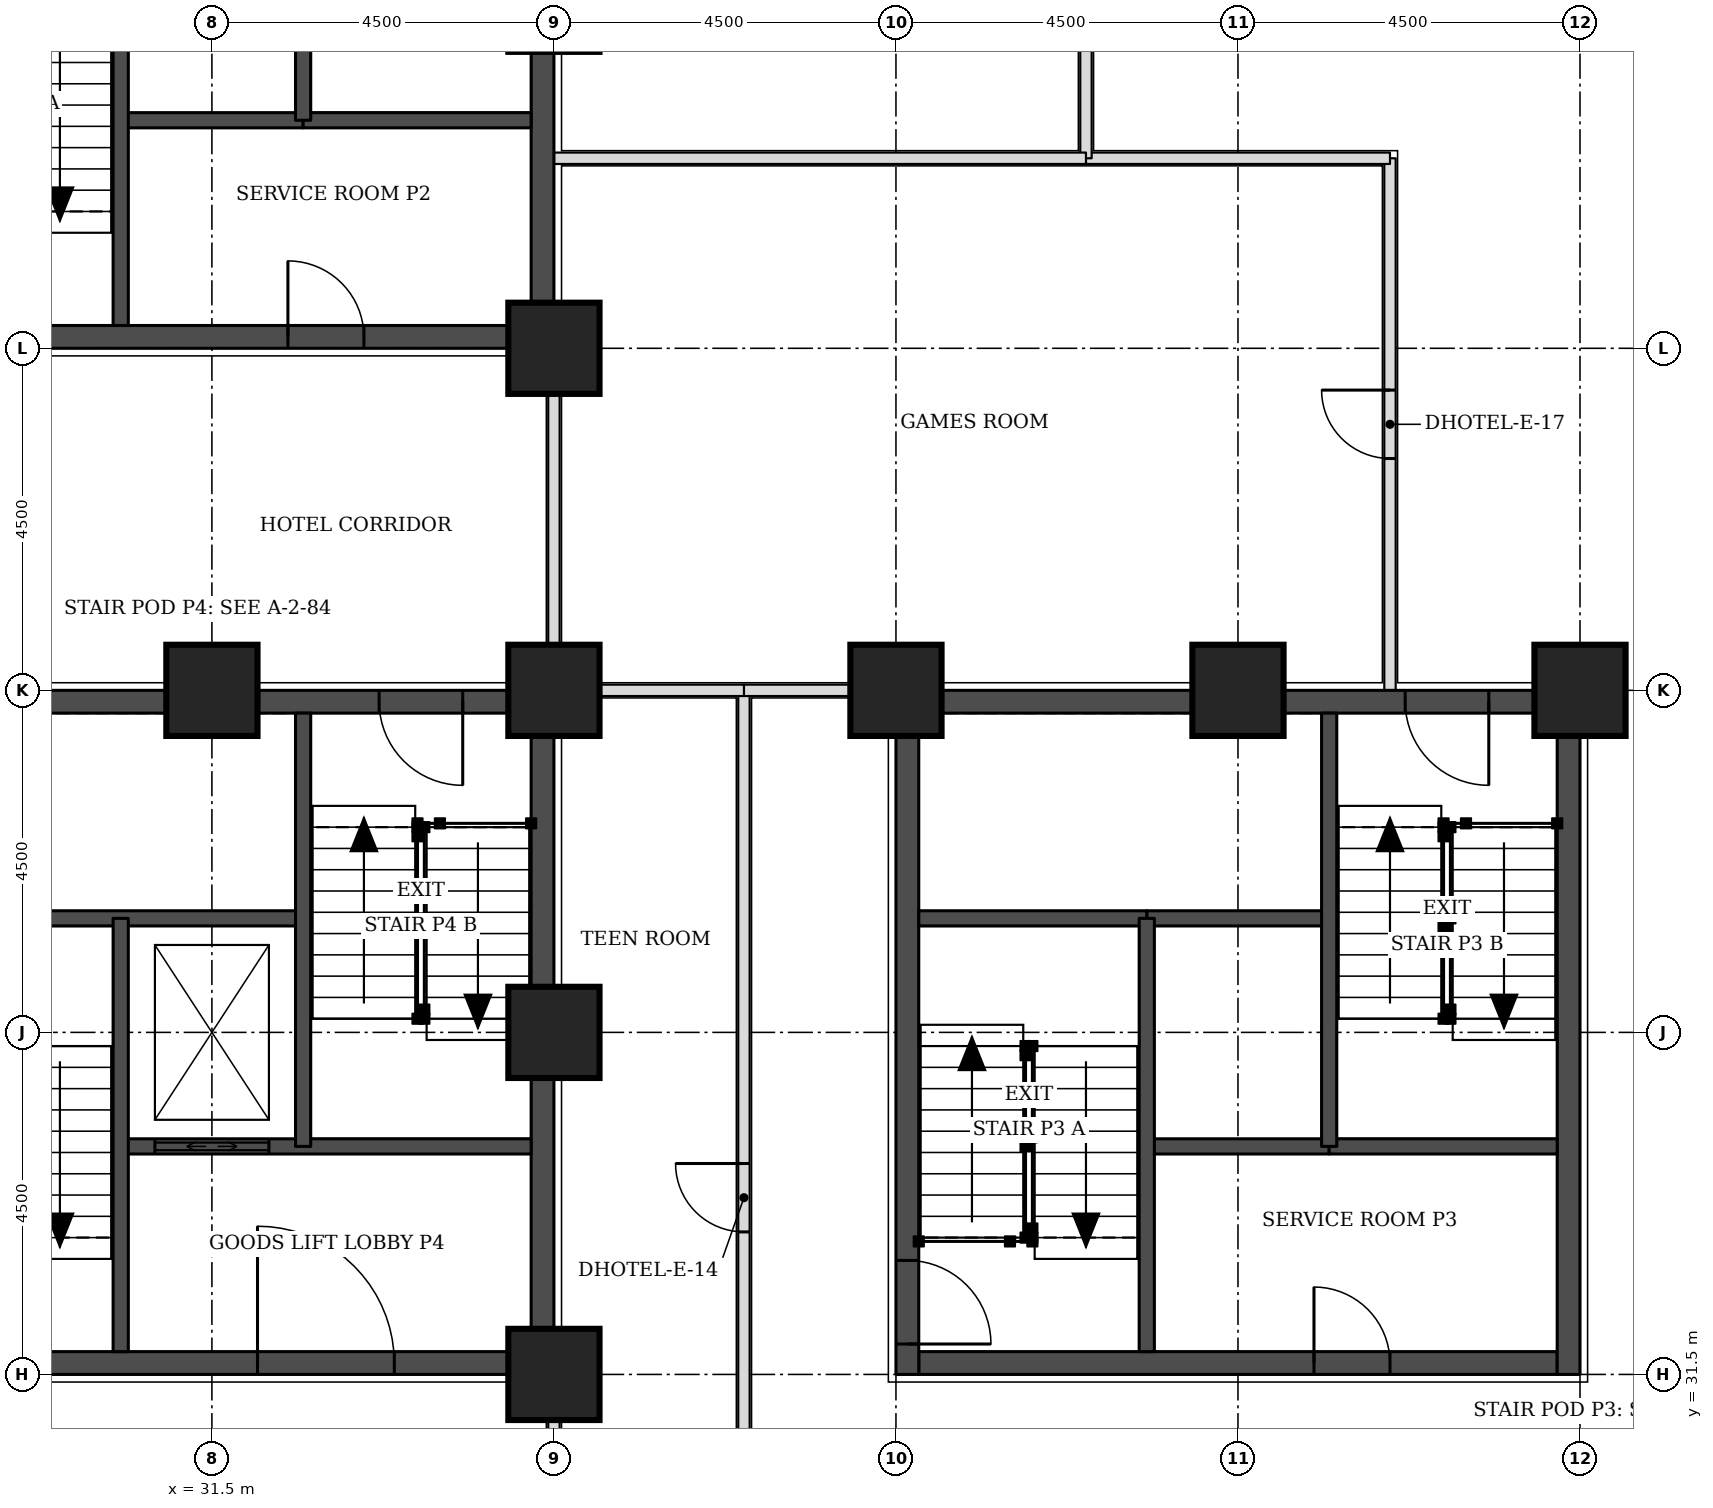
"""IFC4 building model, lengths in metres.
Left out: names, types, materials, properties, quantities, classifications, styles, units other than length and angle.
Written with IfcOpenShell. Run it as: python <this file> out.ifc"""

import sys

from ifc_helpers import new_model, si_unit, direction, frame, frame_2d, origin, origin_2d, place, context, subcontext, project, spatial, rectangle, extrude, element, fill, save


model = new_model("IFC4")
c1 = context("Model", 3, precision=1e-05, world=origin(), true_north=direction((0.0, 1.0)))
c2 = subcontext(c1, "Body", "Model", "MODEL_VIEW")
j1 = project(units=[si_unit("LENGTHUNIT", "METRE"), si_unit("PLANEANGLEUNIT", "RADIAN")], contexts=[c1])
p1 = place(None, origin())
s1 = spatial("IfcSite", under=j1, at=p1, CompositionType="ELEMENT")
p2 = place(p1, origin())
s2 = spatial("IfcBuilding", under=s1, at=p2, CompositionType="ELEMENT")
p3 = place(p2, frame((0.0, 0.0, 62.7)))
s3 = spatial("IfcBuildingStorey", under=s2, at=p3, CompositionType="ELEMENT", Elevation=62.7)
for number, where, z_axis, x_axis in (
    (1, (36.0, 31.5, 0.0), (0.0, 0.0, 1.0), (1.0, 0.0, 0.0)),
    (2, (36.0, 36.0, 0.0), (0.0, 0.0, 1.0), (1.0, 0.0, 0.0)),
    (3, (31.5, 40.5, 0.0), (0.0, 0.0, 1.0), (1.0, 0.0, 0.0)),
    (4, (36.0, 40.5, 0.0), (0.0, 0.0, 1.0), (1.0, 0.0, 0.0)),
    (5, (40.5, 40.5, 0.0), (0.0, 0.0, 1.0), (1.0, 0.0, 0.0)),
    (6, (45.0, 40.5, 0.0), (0.0, 0.0, 1.0), (1.0, 0.0, 0.0)),
    (7, (49.5, 40.5, 0.0), (0.0, 0.0, 1.0), (1.0, 0.0, 0.0)),
    (8, (36.0, 45.0, 0.0), (0.0, 0.0, 1.0), (1.0, 0.0, 0.0)),
):
    element("IfcColumn", number, at=place(p3, frame(where, z_axis=z_axis, x_axis=x_axis)), inside=s3, PredefinedType="COLUMN", context=c2, shape_type="SweptSolid", body=[
        extrude(rectangle(XDim=1.2, YDim=1.2, at=origin_2d()), origin(), (0.0, 0.0, 1.0), 3.3),
    ])
p4 = place(p3, frame((27.3, 45.15, 0.0), z_axis=(0.0, 0.0, 1.0), x_axis=(1.0, 0.0, 0.0)))
e9 = element("IfcWall", 9, at=p4, inside=s3, PredefinedType="SHEAR", context=c2, shape_type="SweptSolid", body=[
    extrude(rectangle(XDim=8.4, YDim=0.3, at=frame_2d((4.2, 0.0))), origin(), (0.0, 0.0, 1.0), 3.3),
])
p5 = place(p4, frame((5.2, 0.0, 0.0)))
e10 = element("IfcOpeningElement", 10, at=p5, cuts=e9, PredefinedType="OPENING", context=c2, shape_type="SweptSolid", body=[
    extrude(rectangle(XDim=1.0, YDim=2.1, at=frame_2d((0.5, 1.05))), frame((0.0, 0.16, 0.0), z_axis=(0.0, -1.0, 0.0), x_axis=(1.0, 0.0, 0.0)), (0.0, 0.0, 1.0), 0.32),
])
p6 = place(p3, frame((35.85, 45.0, 0.0), z_axis=(0.0, 0.0, 1.0), x_axis=(0.0, 1.0, 0.0)))
e11 = element("IfcWall", 11, at=p6, inside=s3, PredefinedType="SHEAR", context=c2, shape_type="SweptSolid", body=[
    extrude(rectangle(XDim=9.0, YDim=0.3, at=frame_2d((4.5, 0.0))), origin(), (0.0, 0.0, 1.0), 3.3),
])
p7 = place(p3, frame((40.8, 31.65, 0.0), z_axis=(0.0, 0.0, 1.0), x_axis=(1.0, 0.0, 0.0)))
e12 = element("IfcWall", 12, at=p7, inside=s3, PredefinedType="SHEAR", context=c2, shape_type="SweptSolid", body=[
    extrude(rectangle(XDim=8.4, YDim=0.3, at=frame_2d((4.2, 0.0))), origin(), (0.0, 0.0, 1.0), 3.3),
])
p8 = place(p7, frame((5.2, 0.0, 0.0)))
e13 = element("IfcOpeningElement", 13, at=p8, cuts=e12, PredefinedType="OPENING", context=c2, shape_type="SweptSolid", body=[
    extrude(rectangle(XDim=1.0, YDim=2.1, at=frame_2d((0.5, 1.05))), frame((0.0, 0.16, 0.0), z_axis=(0.0, -1.0, 0.0), x_axis=(1.0, 0.0, 0.0)), (0.0, 0.0, 1.0), 0.32),
])
p9 = place(p3, frame((40.8, 40.35, 0.0), z_axis=(0.0, 0.0, 1.0), x_axis=(1.0, 0.0, 0.0)))
e14 = element("IfcWall", 14, at=p9, inside=s3, PredefinedType="SHEAR", context=c2, shape_type="SweptSolid", body=[
    extrude(rectangle(XDim=8.4, YDim=0.3, at=frame_2d((4.2, 0.0))), origin(), (0.0, 0.0, 1.0), 3.3),
])
p10 = place(p9, frame((6.4, 0.0, 0.0)))
e15 = element("IfcOpeningElement", 15, at=p10, cuts=e14, PredefinedType="OPENING", context=c2, shape_type="SweptSolid", body=[
    extrude(rectangle(XDim=1.1, YDim=2.1, at=frame_2d((0.55, 1.05))), frame((0.0, 0.16, 0.0), z_axis=(0.0, -1.0, 0.0), x_axis=(1.0, 0.0, 0.0)), (0.0, 0.0, 1.0), 0.32),
])
p11 = place(p3, frame((40.65, 31.5, 0.0), z_axis=(0.0, 0.0, 1.0), x_axis=(0.0, 1.0, 0.0)))
e16 = element("IfcWall", 16, at=p11, inside=s3, PredefinedType="SHEAR", context=c2, shape_type="SweptSolid", body=[
    extrude(rectangle(XDim=9.0, YDim=0.3, at=frame_2d((4.5, 0.0))), origin(), (0.0, 0.0, 1.0), 3.3),
])
p12 = place(p11, frame((0.4, 0.0, 0.0)))
e17 = element("IfcOpeningElement", 17, at=p12, cuts=e16, PredefinedType="OPENING", context=c2, shape_type="SweptSolid", body=[
    extrude(rectangle(XDim=1.1, YDim=2.1, at=frame_2d((0.55, 1.05))), frame((0.0, 0.16, 0.0), z_axis=(0.0, -1.0, 0.0), x_axis=(1.0, 0.0, 0.0)), (0.0, 0.0, 1.0), 0.32),
])
p13 = place(p3, frame((49.35, 31.5, 0.0), z_axis=(0.0, 0.0, 1.0), x_axis=(0.0, 1.0, 0.0)))
e18 = element("IfcWall", 18, at=p13, inside=s3, PredefinedType="SHEAR", context=c2, shape_type="SweptSolid", body=[
    extrude(rectangle(XDim=9.0, YDim=0.3, at=frame_2d((4.5, 0.0))), origin(), (0.0, 0.0, 1.0), 3.3),
])
p14 = place(p3, frame((27.3, 31.65, 0.0), z_axis=(0.0, 0.0, 1.0), x_axis=(1.0, 0.0, 0.0)))
e19 = element("IfcWall", 19, at=p14, inside=s3, PredefinedType="SHEAR", context=c2, shape_type="SweptSolid", body=[
    extrude(rectangle(XDim=8.4, YDim=0.3, at=frame_2d((4.2, 0.0))), origin(), (0.0, 0.0, 1.0), 3.3),
])
p15 = place(p14, frame((4.8, 0.0, 0.0)))
e20 = element("IfcOpeningElement", 20, at=p15, cuts=e19, PredefinedType="OPENING", context=c2, shape_type="SweptSolid", body=[
    extrude(rectangle(XDim=1.8, YDim=2.1, at=frame_2d((0.9, 1.05))), frame((0.0, 0.16, 0.0), z_axis=(0.0, -1.0, 0.0), x_axis=(1.0, 0.0, 0.0)), (0.0, 0.0, 1.0), 0.32),
])
p16 = place(p3, frame((27.3, 40.35, 0.0), z_axis=(0.0, 0.0, 1.0), x_axis=(1.0, 0.0, 0.0)))
e21 = element("IfcWall", 21, at=p16, inside=s3, PredefinedType="SHEAR", context=c2, shape_type="SweptSolid", body=[
    extrude(rectangle(XDim=8.4, YDim=0.3, at=frame_2d((4.2, 0.0))), origin(), (0.0, 0.0, 1.0), 3.3),
])
p17 = place(p16, frame((6.4, 0.0, 0.0)))
e22 = element("IfcOpeningElement", 22, at=p17, cuts=e21, PredefinedType="OPENING", context=c2, shape_type="SweptSolid", body=[
    extrude(rectangle(XDim=1.1, YDim=2.1, at=frame_2d((0.55, 1.05))), frame((0.0, 0.16, 0.0), z_axis=(0.0, -1.0, 0.0), x_axis=(1.0, 0.0, 0.0)), (0.0, 0.0, 1.0), 0.32),
])
p18 = place(p3, frame((35.85, 31.5, 0.0), z_axis=(0.0, 0.0, 1.0), x_axis=(0.0, 1.0, 0.0)))
e23 = element("IfcWall", 23, at=p18, inside=s3, PredefinedType="SHEAR", context=c2, shape_type="SweptSolid", body=[
    extrude(rectangle(XDim=9.0, YDim=0.3, at=frame_2d((4.5, 0.0))), origin(), (0.0, 0.0, 1.0), 3.3),
])
p19 = place(p3, frame((38.5, 27.15, 0.0), z_axis=(0.0, 0.0, 1.0), x_axis=(0.0, 1.0, 0.0)))
e24 = element("IfcWall", 24, at=p19, inside=s3, PredefinedType="PARTITIONING", context=c2, shape_type="SweptSolid", body=[
    extrude(rectangle(XDim=13.35, YDim=0.15, at=frame_2d((6.675, 0.0))), origin(), (0.0, 0.0, 1.0), 3.08),
])
p20 = place(p19, frame((6.225, 0.0, 0.0)))
e25 = element("IfcOpeningElement", 25, at=p20, cuts=e24, PredefinedType="OPENING", context=c2, shape_type="SweptSolid", body=[
    extrude(rectangle(XDim=0.9, YDim=2.1, at=frame_2d((0.45, 1.05))), frame((0.0, 0.085, 0.0), z_axis=(0.0, -1.0, 0.0), x_axis=(1.0, 0.0, 0.0)), (0.0, 0.0, 1.0), 0.17),
])
for number, where, z_axis, x_axis in (
    (26, (36.0, 29.5, 0.0), (0.0, 0.0, 1.0), (0.0, 1.0, 0.0)),
    (27, (38.5, 40.5, 0.0), (0.0, 0.0, 1.0), (1.0, 0.0, 0.0)),
):
    element("IfcWall", number, at=place(p3, frame(where, z_axis=z_axis, x_axis=x_axis)), inside=s3, PredefinedType="PARTITIONING", context=c2, shape_type="SweptSolid", body=[
        extrude(rectangle(XDim=1.95, YDim=0.15, at=frame_2d((0.975, 0.0))), origin(), (0.0, 0.0, 1.0), 2.33),
    ])
p21 = place(p3, frame((36.0, 40.55, 0.0), z_axis=(0.0, 0.0, 1.0), x_axis=(0.0, 1.0, 0.0)))
e28 = element("IfcWall", 28, at=p21, inside=s3, PredefinedType="PARTITIONING", context=c2, shape_type="SweptSolid", body=[
    extrude(rectangle(XDim=4.4, YDim=0.15, at=frame_2d((2.2, 0.0))), origin(), (0.0, 0.0, 1.0), 2.33),
])
p22 = place(p3, frame((47.0, 40.5, 0.0), z_axis=(0.0, 0.0, 1.0), x_axis=(0.0, 1.0, 0.0)))
e29 = element("IfcWall", 29, at=p22, inside=s3, PredefinedType="PARTITIONING", context=c2, shape_type="SweptSolid", body=[
    extrude(rectangle(XDim=7.0, YDim=0.15, at=frame_2d((3.5, 0.0))), origin(), (0.0, 0.0, 1.0), 3.08),
])
p23 = place(p22, frame((3.05, 0.0, 0.0)))
e30 = element("IfcOpeningElement", 30, at=p23, cuts=e29, PredefinedType="OPENING", context=c2, shape_type="SweptSolid", body=[
    extrude(rectangle(XDim=0.9, YDim=2.1, at=frame_2d((0.45, 1.05))), frame((0.0, 0.085, 0.0), z_axis=(0.0, -1.0, 0.0), x_axis=(1.0, 0.0, 0.0)), (0.0, 0.0, 1.0), 0.17),
])
p24 = place(p3, frame((43.0, 47.5, 0.0), z_axis=(0.0, 0.0, 1.0), x_axis=(1.0, 0.0, 0.0)))
e31 = element("IfcWall", 31, at=p24, inside=s3, PredefinedType="PARTITIONING", context=c2, shape_type="SweptSolid", body=[
    extrude(rectangle(XDim=4.0, YDim=0.15, at=frame_2d((2.0, 0.0))), origin(), (0.0, 0.0, 1.0), 3.08),
])
p25 = place(p3, frame((43.0, 47.5, 0.0), z_axis=(0.0, 0.0, 1.0), x_axis=(0.0, 1.0, 0.0)))
e32 = element("IfcWall", 32, at=p25, inside=s3, PredefinedType="PARTITIONING", context=c2, shape_type="SweptSolid", body=[
    extrude(rectangle(XDim=7.85, YDim=0.15, at=frame_2d((3.925, 0.0))), origin(), (0.0, 0.0, 1.0), 3.08),
])
p26 = place(p25, frame((3.475, 0.0, 0.0)))
e33 = element("IfcOpeningElement", 33, at=p26, cuts=e32, PredefinedType="OPENING", context=c2, shape_type="SweptSolid", body=[
    extrude(rectangle(XDim=0.9, YDim=2.1, at=frame_2d((0.45, 1.05))), frame((0.0, 0.085, 0.0), z_axis=(0.0, -1.0, 0.0), x_axis=(1.0, 0.0, 0.0)), (0.0, 0.0, 1.0), 0.17),
])
p27 = place(p3, frame((36.05, 40.5, 0.0), z_axis=(0.0, 0.0, 1.0), x_axis=(1.0, 0.0, 0.0)))
e34 = element("IfcWall", 34, at=p27, inside=s3, PredefinedType="PARTITIONING", context=c2, shape_type="SweptSolid", body=[
    extrude(rectangle(XDim=2.45, YDim=0.15, at=frame_2d((1.225, 0.0))), origin(), (0.0, 0.0, 1.0), 2.33),
])
p28 = place(p3, frame((36.0, 47.5, 0.0), z_axis=(0.0, 0.0, 1.0), x_axis=(1.0, 0.0, 0.0)))
e35 = element("IfcWall", 35, at=p28, inside=s3, PredefinedType="PARTITIONING", context=c2, shape_type="SweptSolid", body=[
    extrude(rectangle(XDim=7.0, YDim=0.15, at=frame_2d((3.5, 0.0))), origin(), (0.0, 0.0, 1.0), 3.08),
])
p29 = place(p3, frame((30.3, 48.0, 0.0), z_axis=(0.0, 0.0, 1.0), x_axis=(1.0, 0.0, 0.0)))
e36 = element("IfcWall", 36, at=p29, inside=s3, PredefinedType="SOLIDWALL", context=c2, shape_type="SweptSolid", body=[
    extrude(rectangle(XDim=2.4, YDim=0.2, at=frame_2d((1.2, 0.0))), origin(), (0.0, 0.0, 1.0), 3.08),
])
p30 = place(p3, frame((32.7, 48.0, 0.0), z_axis=(0.0, 0.0, 1.0), x_axis=(1.0, 0.0, 0.0)))
e37 = element("IfcWall", 37, at=p30, inside=s3, PredefinedType="SOLIDWALL", context=c2, shape_type="SweptSolid", body=[
    extrude(rectangle(XDim=3.0, YDim=0.2, at=frame_2d((1.5, 0.0))), origin(), (0.0, 0.0, 1.0), 3.08),
])
for number, where, z_axis, x_axis in (
    (38, (30.3, 45.3, 0.0), (0.0, 0.0, 1.0), (0.0, 1.0, 0.0)),
    (39, (32.7, 48.0, 0.0), (0.0, 0.0, 1.0), (0.0, 1.0, 0.0)),
):
    element("IfcWall", number, at=place(p3, frame(where, z_axis=z_axis, x_axis=x_axis)), inside=s3, PredefinedType="SOLIDWALL", context=c2, shape_type="SweptSolid", body=[
        extrude(rectangle(XDim=5.7, YDim=0.2, at=frame_2d((2.85, 0.0))), origin(), (0.0, 0.0, 1.0), 3.08),
    ])
p31 = place(p3, frame((43.8, 34.5, 0.0), z_axis=(0.0, 0.0, 1.0), x_axis=(1.0, 0.0, 0.0)))
e40 = element("IfcWall", 40, at=p31, inside=s3, PredefinedType="SOLIDWALL", context=c2, shape_type="SweptSolid", body=[
    extrude(rectangle(XDim=2.4, YDim=0.2, at=frame_2d((1.2, 0.0))), origin(), (0.0, 0.0, 1.0), 3.08),
])
p32 = place(p3, frame((46.2, 34.5, 0.0), z_axis=(0.0, 0.0, 1.0), x_axis=(1.0, 0.0, 0.0)))
e41 = element("IfcWall", 41, at=p32, inside=s3, PredefinedType="SOLIDWALL", context=c2, shape_type="SweptSolid", body=[
    extrude(rectangle(XDim=3.0, YDim=0.2, at=frame_2d((1.5, 0.0))), origin(), (0.0, 0.0, 1.0), 3.08),
])
p33 = place(p3, frame((43.8, 37.5, 0.0), z_axis=(0.0, 0.0, 1.0), x_axis=(1.0, 0.0, 0.0)))
e42 = element("IfcWall", 42, at=p33, inside=s3, PredefinedType="SOLIDWALL", context=c2, shape_type="SweptSolid", body=[
    extrude(rectangle(XDim=2.4, YDim=0.2, at=frame_2d((1.2, 0.0))), origin(), (0.0, 0.0, 1.0), 3.3),
])
p34 = place(p3, frame((40.8, 37.5, 0.0), z_axis=(0.0, 0.0, 1.0), x_axis=(1.0, 0.0, 0.0)))
e43 = element("IfcWall", 43, at=p34, inside=s3, PredefinedType="SOLIDWALL", context=c2, shape_type="SweptSolid", body=[
    extrude(rectangle(XDim=3.0, YDim=0.2, at=frame_2d((1.5, 0.0))), origin(), (0.0, 0.0, 1.0), 3.08),
])
for number, where, z_axis, x_axis in (
    (44, (43.8, 31.8, 0.0), (0.0, 0.0, 1.0), (0.0, 1.0, 0.0)),
    (45, (46.2, 34.5, 0.0), (0.0, 0.0, 1.0), (0.0, 1.0, 0.0)),
):
    element("IfcWall", number, at=place(p3, frame(where, z_axis=z_axis, x_axis=x_axis)), inside=s3, PredefinedType="SOLIDWALL", context=c2, shape_type="SweptSolid", body=[
        extrude(rectangle(XDim=5.7, YDim=0.2, at=frame_2d((2.85, 0.0))), origin(), (0.0, 0.0, 1.0), 3.08),
    ])
p35 = place(p3, frame((30.3, 34.5, 0.0), z_axis=(0.0, 0.0, 1.0), x_axis=(1.0, 0.0, 0.0)))
e46 = element("IfcWall", 46, at=p35, inside=s3, PredefinedType="SOLIDWALL", context=c2, shape_type="SweptSolid", body=[
    extrude(rectangle(XDim=5.4, YDim=0.2, at=frame_2d((2.7, 0.0))), origin(), (0.0, 0.0, 1.0), 3.08),
])
p36 = place(p35, frame((0.45, 0.0, 0.0)))
e47 = element("IfcOpeningElement", 47, at=p36, cuts=e46, PredefinedType="OPENING", context=c2, shape_type="SweptSolid", body=[
    extrude(rectangle(XDim=1.5, YDim=2.1, at=frame_2d((0.75, 1.05))), frame((0.0, 0.11, 0.0), z_axis=(0.0, -1.0, 0.0), x_axis=(1.0, 0.0, 0.0)), (0.0, 0.0, 1.0), 0.22),
])
p37 = place(p3, frame((27.3, 37.5, 0.0), z_axis=(0.0, 0.0, 1.0), x_axis=(1.0, 0.0, 0.0)))
e48 = element("IfcWall", 48, at=p37, inside=s3, PredefinedType="SOLIDWALL", context=c2, shape_type="SweptSolid", body=[
    extrude(rectangle(XDim=5.4, YDim=0.2, at=frame_2d((2.7, 0.0))), origin(), (0.0, 0.0, 1.0), 3.08),
])
for number, where, z_axis, x_axis in (
    (49, (30.3, 31.8, 0.0), (0.0, 0.0, 1.0), (0.0, 1.0, 0.0)),
    (50, (32.7, 34.5, 0.0), (0.0, 0.0, 1.0), (0.0, 1.0, 0.0)),
):
    element("IfcWall", number, at=place(p3, frame(where, z_axis=z_axis, x_axis=x_axis)), inside=s3, PredefinedType="SOLIDWALL", context=c2, shape_type="SweptSolid", body=[
        extrude(rectangle(XDim=5.7, YDim=0.2, at=frame_2d((2.85, 0.0))), origin(), (0.0, 0.0, 1.0), 3.08),
    ])
p38 = place(p20, origin())
e51 = element("IfcDoor", 51, at=p38, inside=s3, OperationType="SINGLE_SWING_RIGHT", PredefinedType="DOOR", context=c2, shape_type="SweptSolid", body=[
    extrude(rectangle(XDim=0.9, YDim=2.1, at=frame_2d((0.45, 1.05))), frame((0.0, 0.025, 0.0), z_axis=(0.0, -1.0, 0.0), x_axis=(1.0, 0.0, 0.0)), (0.0, 0.0, 1.0), 0.05),
])
fill(e25, e51)
p39 = place(p23, origin())
e52 = element("IfcDoor", 52, at=p39, inside=s3, OperationType="SINGLE_SWING_RIGHT", PredefinedType="DOOR", context=c2, shape_type="SweptSolid", body=[
    extrude(rectangle(XDim=0.9, YDim=2.1, at=frame_2d((0.45, 1.05))), frame((0.0, 0.025, 0.0), z_axis=(0.0, -1.0, 0.0), x_axis=(1.0, 0.0, 0.0)), (0.0, 0.0, 1.0), 0.05),
])
fill(e30, e52)
p40 = place(p5, origin())
e53 = element("IfcDoor", 53, at=p40, inside=s3, OperationType="SINGLE_SWING_LEFT", PredefinedType="DOOR", context=c2, shape_type="SweptSolid", body=[
    extrude(rectangle(XDim=1.0, YDim=2.1, at=frame_2d((0.5, 1.05))), frame((0.0, 0.025, 0.0), z_axis=(0.0, -1.0, 0.0), x_axis=(1.0, 0.0, 0.0)), (0.0, 0.0, 1.0), 0.05),
])
fill(e10, e53)
p41 = place(p12, frame((1.1, 0.0, 0.0), z_axis=(0.0, 0.0, 1.0), x_axis=(-1.0, 0.0, 0.0)))
e54 = element("IfcDoor", 54, at=p41, inside=s3, OperationType="SINGLE_SWING_RIGHT", PredefinedType="DOOR", context=c2, shape_type="SweptSolid", body=[
    extrude(rectangle(XDim=1.1, YDim=2.1, at=frame_2d((0.55, 1.05))), frame((0.0, 0.025, 0.0), z_axis=(0.0, -1.0, 0.0), x_axis=(1.0, 0.0, 0.0)), (0.0, 0.0, 1.0), 0.05),
])
fill(e17, e54)
p42 = place(p10, frame((1.1, 0.0, 0.0), z_axis=(0.0, 0.0, 1.0), x_axis=(-1.0, 0.0, 0.0)))
e55 = element("IfcDoor", 55, at=p42, inside=s3, OperationType="SINGLE_SWING_LEFT", PredefinedType="DOOR", context=c2, shape_type="SweptSolid", body=[
    extrude(rectangle(XDim=1.1, YDim=2.1, at=frame_2d((0.55, 1.05))), frame((0.0, 0.025, 0.0), z_axis=(0.0, -1.0, 0.0), x_axis=(1.0, 0.0, 0.0)), (0.0, 0.0, 1.0), 0.05),
])
fill(e15, e55)
p43 = place(p8, origin())
e56 = element("IfcDoor", 56, at=p43, inside=s3, OperationType="SINGLE_SWING_LEFT", PredefinedType="DOOR", context=c2, shape_type="SweptSolid", body=[
    extrude(rectangle(XDim=1.0, YDim=2.1, at=frame_2d((0.5, 1.05))), frame((0.0, 0.025, 0.0), z_axis=(0.0, -1.0, 0.0), x_axis=(1.0, 0.0, 0.0)), (0.0, 0.0, 1.0), 0.05),
])
fill(e13, e56)
p44 = place(p17, frame((1.1, 0.0, 0.0), z_axis=(0.0, 0.0, 1.0), x_axis=(-1.0, 0.0, 0.0)))
e57 = element("IfcDoor", 57, at=p44, inside=s3, OperationType="SINGLE_SWING_LEFT", PredefinedType="DOOR", context=c2, shape_type="SweptSolid", body=[
    extrude(rectangle(XDim=1.1, YDim=2.1, at=frame_2d((0.55, 1.05))), frame((0.0, 0.025, 0.0), z_axis=(0.0, -1.0, 0.0), x_axis=(1.0, 0.0, 0.0)), (0.0, 0.0, 1.0), 0.05),
])
fill(e22, e57)
p45 = place(p36, origin())
e58 = element("IfcDoor", 58, at=p45, inside=s3, OperationType="DOUBLE_DOOR_SLIDING", PredefinedType="DOOR", context=c2, shape_type="SweptSolid", body=[
    extrude(rectangle(XDim=1.5, YDim=2.1, at=frame_2d((0.75, 1.05))), frame((0.0, 0.025, 0.0), z_axis=(0.0, -1.0, 0.0), x_axis=(1.0, 0.0, 0.0)), (0.0, 0.0, 1.0), 0.05),
])
fill(e47, e58)
p46 = place(p15, origin())
e59 = element("IfcDoor", 59, at=p46, inside=s3, OperationType="SINGLE_SWING_LEFT", PredefinedType="DOOR", context=c2, shape_type="SweptSolid", body=[
    extrude(rectangle(XDim=1.8, YDim=2.1, at=frame_2d((0.9, 1.05))), frame((0.0, 0.025, 0.0), z_axis=(0.0, -1.0, 0.0), x_axis=(1.0, 0.0, 0.0)), (0.0, 0.0, 1.0), 0.05),
])
fill(e20, e59)
save(model, sys.argv[1])
